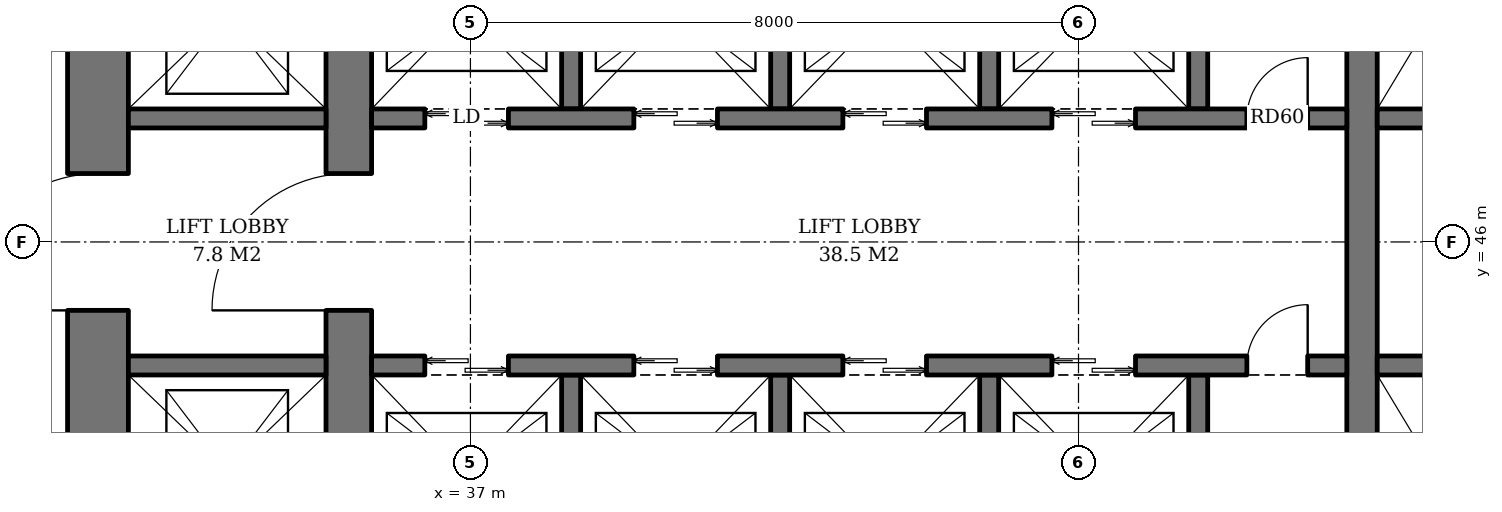
"""IFC4 building model, lengths in metres.
Left out: names, types, materials, properties, quantities, classifications, styles, units other than length and angle.
Written with IfcOpenShell. Run it as: python <this file> out.ifc"""

import sys

from ifc_helpers import new_model, si_unit, direction, frame, frame_2d, origin, place, context, subcontext, project, spatial, rectangle, extrude, element, fill, save


model = new_model("IFC4")
c1 = context("Model", 3, precision=1e-05, world=origin(), true_north=direction((0.0, 1.0)))
c2 = subcontext(c1, "Body", "Model", "MODEL_VIEW")
j1 = project(units=[si_unit("LENGTHUNIT", "METRE"), si_unit("PLANEANGLEUNIT", "RADIAN")], contexts=[c1])
p1 = place(None, origin())
s1 = spatial("IfcSite", under=j1, at=p1, CompositionType="ELEMENT")
p2 = place(p1, origin())
s2 = spatial("IfcBuilding", under=s1, at=p2, CompositionType="ELEMENT")
p3 = place(p2, frame((0.0, 0.0, 36.2)))
s3 = spatial("IfcBuildingStorey", under=s2, at=p3, CompositionType="ELEMENT", Elevation=36.2)
p4 = place(p3, frame((35.4, 36.7, 0.0), z_axis=(0.0, 0.0, 1.0), x_axis=(0.0, 1.0, 0.0)))
e1 = element("IfcWall", 1, at=p4, inside=s3, PredefinedType="SHEAR", context=c2, shape_type="SweptSolid", body=[
    extrude(rectangle(XDim=18.6, YDim=0.6, at=frame_2d((9.3, 0.0))), origin(), (0.0, 0.0, 1.0), 3.8),
])
p5 = place(p4, frame((8.4, 0.0, 0.0)))
e2 = element("IfcOpeningElement", 2, at=p5, cuts=e1, PredefinedType="OPENING", context=c2, shape_type="SweptSolid", body=[
    extrude(rectangle(XDim=1.8, YDim=2.4, at=frame_2d((0.9, 1.2))), frame((0.0, 0.31, 0.0), z_axis=(0.0, -1.0, 0.0), x_axis=(1.0, 0.0, 0.0)), (0.0, 0.0, 1.0), 0.62),
])
p6 = place(p3, frame((32.1, 33.5, 0.0), z_axis=(0.0, 0.0, 1.0), x_axis=(0.0, 1.0, 0.0)))
e3 = element("IfcWall", 3, at=p6, inside=s3, PredefinedType="SHEAR", context=c2, shape_type="SweptSolid", body=[
    extrude(rectangle(XDim=25.0, YDim=0.8, at=frame_2d((12.5, 0.0))), origin(), (0.0, 0.0, 1.0), 3.8),
])
p7 = place(p6, frame((11.6, 0.0, 0.0)))
e4 = element("IfcOpeningElement", 4, at=p7, cuts=e3, PredefinedType="OPENING", context=c2, shape_type="SweptSolid", body=[
    extrude(rectangle(XDim=1.8, YDim=2.4, at=frame_2d((0.9, 1.2))), frame((0.0, 0.41, 0.0), z_axis=(0.0, -1.0, 0.0), x_axis=(1.0, 0.0, 0.0)), (0.0, 0.0, 1.0), 0.82),
])
p8 = place(p3, frame((48.73, 40.0, 0.0), z_axis=(0.0, 0.0, 1.0), x_axis=(0.0, 1.0, 0.0)))
e5 = element("IfcWall", 5, at=p8, inside=s3, PredefinedType="SHEAR", context=c2, shape_type="SweptSolid", body=[
    extrude(rectangle(XDim=12.0, YDim=0.4, at=frame_2d((6.0, 0.0))), origin(), (0.0, 0.0, 1.0), 3.8),
])
for number, where, z_axis, x_axis in (
    (6, (38.325, 47.75, 0.0), (0.0, 0.0, 1.0), (0.0, 1.0, 0.0)),
    (7, (41.075, 47.75, 0.0), (0.0, 0.0, 1.0), (0.0, 1.0, 0.0)),
    (8, (43.825, 47.75, 0.0), (0.0, 0.0, 1.0), (0.0, 1.0, 0.0)),
    (9, (46.575, 47.75, 0.0), (0.0, 0.0, 1.0), (0.0, 1.0, 0.0)),
):
    element("IfcWall", number, at=place(p3, frame(where, z_axis=z_axis, x_axis=x_axis)), inside=s3, PredefinedType="SHEAR", context=c2, shape_type="SweptSolid", body=[
        extrude(rectangle(XDim=2.6, YDim=0.25, at=frame_2d((1.3, 0.0))), origin(), (0.0, 0.0, 1.0), 3.8),
    ])
p9 = place(p3, frame((35.7, 47.625, 0.0), z_axis=(0.0, 0.0, 1.0), x_axis=(1.0, 0.0, 0.0)))
e10 = element("IfcWall", 10, at=p9, inside=s3, PredefinedType="SHEAR", context=c2, shape_type="SweptSolid", body=[
    extrude(rectangle(XDim=12.83, YDim=0.25, at=frame_2d((6.415, 0.0))), origin(), (0.0, 0.0, 1.0), 3.8),
])
p10 = place(p9, frame((0.7, 0.0, 0.0)))
e11 = element("IfcOpeningElement", 11, at=p10, cuts=e10, PredefinedType="OPENING", context=c2, shape_type="SweptSolid", body=[
    extrude(rectangle(XDim=1.1, YDim=2.2, at=frame_2d((0.55, 1.1))), frame((0.0, 0.135, 0.0), z_axis=(0.0, -1.0, 0.0), x_axis=(1.0, 0.0, 0.0)), (0.0, 0.0, 1.0), 0.27),
])
p11 = place(p9, frame((3.45, 0.0, 0.0)))
e12 = element("IfcOpeningElement", 12, at=p11, cuts=e10, PredefinedType="OPENING", context=c2, shape_type="SweptSolid", body=[
    extrude(rectangle(XDim=1.1, YDim=2.2, at=frame_2d((0.55, 1.1))), frame((0.0, 0.135, 0.0), z_axis=(0.0, -1.0, 0.0), x_axis=(1.0, 0.0, 0.0)), (0.0, 0.0, 1.0), 0.27),
])
p12 = place(p9, frame((6.2, 0.0, 0.0)))
e13 = element("IfcOpeningElement", 13, at=p12, cuts=e10, PredefinedType="OPENING", context=c2, shape_type="SweptSolid", body=[
    extrude(rectangle(XDim=1.1, YDim=2.2, at=frame_2d((0.55, 1.1))), frame((0.0, 0.135, 0.0), z_axis=(0.0, -1.0, 0.0), x_axis=(1.0, 0.0, 0.0)), (0.0, 0.0, 1.0), 0.27),
])
p13 = place(p9, frame((8.95, 0.0, 0.0)))
e14 = element("IfcOpeningElement", 14, at=p13, cuts=e10, PredefinedType="OPENING", context=c2, shape_type="SweptSolid", body=[
    extrude(rectangle(XDim=1.1, YDim=2.2, at=frame_2d((0.55, 1.1))), frame((0.0, 0.135, 0.0), z_axis=(0.0, -1.0, 0.0), x_axis=(1.0, 0.0, 0.0)), (0.0, 0.0, 1.0), 0.27),
])
p14 = place(p9, frame((11.515, 0.0, 0.0)))
e15 = element("IfcOpeningElement", 15, at=p14, cuts=e10, PredefinedType="OPENING", context=c2, shape_type="SweptSolid", body=[
    extrude(rectangle(XDim=0.8, YDim=2.0, at=frame_2d((0.4, 1.0))), frame((0.0, 0.135, 0.0), z_axis=(0.0, -1.0, 0.0), x_axis=(1.0, 0.0, 0.0)), (0.0, 0.0, 1.0), 0.27),
])
for number, where, z_axis, x_axis in (
    (16, (38.325, 44.25, 0.0), (0.0, 0.0, 1.0), (0.0, -1.0, 0.0)),
    (17, (41.075, 44.25, 0.0), (0.0, 0.0, 1.0), (0.0, -1.0, 0.0)),
    (18, (43.825, 44.25, 0.0), (0.0, 0.0, 1.0), (0.0, -1.0, 0.0)),
    (19, (46.575, 44.25, 0.0), (0.0, 0.0, 1.0), (0.0, -1.0, 0.0)),
):
    element("IfcWall", number, at=place(p3, frame(where, z_axis=z_axis, x_axis=x_axis)), inside=s3, PredefinedType="SHEAR", context=c2, shape_type="SweptSolid", body=[
        extrude(rectangle(XDim=2.6, YDim=0.25, at=frame_2d((1.3, 0.0))), origin(), (0.0, 0.0, 1.0), 3.8),
    ])
p15 = place(p3, frame((35.7, 44.375, 0.0), z_axis=(0.0, 0.0, 1.0), x_axis=(1.0, 0.0, 0.0)))
e20 = element("IfcWall", 20, at=p15, inside=s3, PredefinedType="SHEAR", context=c2, shape_type="SweptSolid", body=[
    extrude(rectangle(XDim=12.83, YDim=0.25, at=frame_2d((6.415, 0.0))), origin(), (0.0, 0.0, 1.0), 3.8),
])
p16 = place(p15, frame((0.7, 0.0, 0.0)))
e21 = element("IfcOpeningElement", 21, at=p16, cuts=e20, PredefinedType="OPENING", context=c2, shape_type="SweptSolid", body=[
    extrude(rectangle(XDim=1.1, YDim=2.2, at=frame_2d((0.55, 1.1))), frame((0.0, 0.135, 0.0), z_axis=(0.0, -1.0, 0.0), x_axis=(1.0, 0.0, 0.0)), (0.0, 0.0, 1.0), 0.27),
])
p17 = place(p15, frame((3.45, 0.0, 0.0)))
e22 = element("IfcOpeningElement", 22, at=p17, cuts=e20, PredefinedType="OPENING", context=c2, shape_type="SweptSolid", body=[
    extrude(rectangle(XDim=1.1, YDim=2.2, at=frame_2d((0.55, 1.1))), frame((0.0, 0.135, 0.0), z_axis=(0.0, -1.0, 0.0), x_axis=(1.0, 0.0, 0.0)), (0.0, 0.0, 1.0), 0.27),
])
p18 = place(p15, frame((6.2, 0.0, 0.0)))
e23 = element("IfcOpeningElement", 23, at=p18, cuts=e20, PredefinedType="OPENING", context=c2, shape_type="SweptSolid", body=[
    extrude(rectangle(XDim=1.1, YDim=2.2, at=frame_2d((0.55, 1.1))), frame((0.0, 0.135, 0.0), z_axis=(0.0, -1.0, 0.0), x_axis=(1.0, 0.0, 0.0)), (0.0, 0.0, 1.0), 0.27),
])
p19 = place(p15, frame((8.95, 0.0, 0.0)))
e24 = element("IfcOpeningElement", 24, at=p19, cuts=e20, PredefinedType="OPENING", context=c2, shape_type="SweptSolid", body=[
    extrude(rectangle(XDim=1.1, YDim=2.2, at=frame_2d((0.55, 1.1))), frame((0.0, 0.135, 0.0), z_axis=(0.0, -1.0, 0.0), x_axis=(1.0, 0.0, 0.0)), (0.0, 0.0, 1.0), 0.27),
])
p20 = place(p15, frame((11.515, 0.0, 0.0)))
e25 = element("IfcOpeningElement", 25, at=p20, cuts=e20, PredefinedType="OPENING", context=c2, shape_type="SweptSolid", body=[
    extrude(rectangle(XDim=0.8, YDim=2.0, at=frame_2d((0.4, 1.0))), frame((0.0, 0.135, 0.0), z_axis=(0.0, -1.0, 0.0), x_axis=(1.0, 0.0, 0.0)), (0.0, 0.0, 1.0), 0.27),
])
for number, where, z_axis, x_axis in (
    (26, (48.93, 47.625, 0.0), (0.0, 0.0, 1.0), (1.0, 0.0, 0.0)),
    (27, (48.93, 44.375, 0.0), (0.0, 0.0, 1.0), (1.0, 0.0, 0.0)),
):
    element("IfcWall", number, at=place(p3, frame(where, z_axis=z_axis, x_axis=x_axis)), inside=s3, PredefinedType="SHEAR", context=c2, shape_type="SweptSolid", body=[
        extrude(rectangle(XDim=5.37, YDim=0.25, at=frame_2d((2.685, 0.0))), origin(), (0.0, 0.0, 1.0), 3.8),
    ])
for number, where, z_axis, x_axis in (
    (28, (32.5, 44.375, 0.0), (0.0, 0.0, 1.0), (1.0, 0.0, 0.0)),
    (29, (32.5, 47.625, 0.0), (0.0, 0.0, 1.0), (1.0, 0.0, 0.0)),
):
    element("IfcWall", number, at=place(p3, frame(where, z_axis=z_axis, x_axis=x_axis)), inside=s3, PredefinedType="SHEAR", context=c2, shape_type="SweptSolid", body=[
        extrude(rectangle(XDim=2.6, YDim=0.25, at=frame_2d((1.3, 0.0))), origin(), (0.0, 0.0, 1.0), 3.8),
    ])
p21 = place(p10, origin())
e30 = element("IfcDoor", 30, at=p21, inside=s3, OperationType="DOUBLE_DOOR_SLIDING", PredefinedType="DOOR", context=c2, shape_type="SweptSolid", body=[
    extrude(rectangle(XDim=1.1, YDim=2.2, at=frame_2d((0.55, 1.1))), frame((0.0, 0.025, 0.0), z_axis=(0.0, -1.0, 0.0), x_axis=(1.0, 0.0, 0.0)), (0.0, 0.0, 1.0), 0.05),
])
fill(e11, e30)
p22 = place(p11, origin())
e31 = element("IfcDoor", 31, at=p22, inside=s3, OperationType="DOUBLE_DOOR_SLIDING", PredefinedType="DOOR", context=c2, shape_type="SweptSolid", body=[
    extrude(rectangle(XDim=1.1, YDim=2.2, at=frame_2d((0.55, 1.1))), frame((0.0, 0.025, 0.0), z_axis=(0.0, -1.0, 0.0), x_axis=(1.0, 0.0, 0.0)), (0.0, 0.0, 1.0), 0.05),
])
fill(e12, e31)
p23 = place(p12, origin())
e32 = element("IfcDoor", 32, at=p23, inside=s3, OperationType="DOUBLE_DOOR_SLIDING", PredefinedType="DOOR", context=c2, shape_type="SweptSolid", body=[
    extrude(rectangle(XDim=1.1, YDim=2.2, at=frame_2d((0.55, 1.1))), frame((0.0, 0.025, 0.0), z_axis=(0.0, -1.0, 0.0), x_axis=(1.0, 0.0, 0.0)), (0.0, 0.0, 1.0), 0.05),
])
fill(e13, e32)
p24 = place(p13, origin())
e33 = element("IfcDoor", 33, at=p24, inside=s3, OperationType="DOUBLE_DOOR_SLIDING", PredefinedType="DOOR", context=c2, shape_type="SweptSolid", body=[
    extrude(rectangle(XDim=1.1, YDim=2.2, at=frame_2d((0.55, 1.1))), frame((0.0, 0.025, 0.0), z_axis=(0.0, -1.0, 0.0), x_axis=(1.0, 0.0, 0.0)), (0.0, 0.0, 1.0), 0.05),
])
fill(e14, e33)
p25 = place(p14, origin())
e34 = element("IfcDoor", 34, at=p25, inside=s3, OperationType="SINGLE_SWING_RIGHT", PredefinedType="DOOR", context=c2, shape_type="SweptSolid", body=[
    extrude(rectangle(XDim=0.8, YDim=2.0, at=frame_2d((0.4, 1.0))), frame((0.0, 0.025, 0.0), z_axis=(0.0, -1.0, 0.0), x_axis=(1.0, 0.0, 0.0)), (0.0, 0.0, 1.0), 0.05),
])
fill(e15, e34)
p26 = place(p16, origin())
e35 = element("IfcDoor", 35, at=p26, inside=s3, OperationType="DOUBLE_DOOR_SLIDING", PredefinedType="DOOR", context=c2, shape_type="SweptSolid", body=[
    extrude(rectangle(XDim=1.1, YDim=2.2, at=frame_2d((0.55, 1.1))), frame((0.0, 0.025, 0.0), z_axis=(0.0, -1.0, 0.0), x_axis=(1.0, 0.0, 0.0)), (0.0, 0.0, 1.0), 0.05),
])
fill(e21, e35)
p27 = place(p17, origin())
e36 = element("IfcDoor", 36, at=p27, inside=s3, OperationType="DOUBLE_DOOR_SLIDING", PredefinedType="DOOR", context=c2, shape_type="SweptSolid", body=[
    extrude(rectangle(XDim=1.1, YDim=2.2, at=frame_2d((0.55, 1.1))), frame((0.0, 0.025, 0.0), z_axis=(0.0, -1.0, 0.0), x_axis=(1.0, 0.0, 0.0)), (0.0, 0.0, 1.0), 0.05),
])
fill(e22, e36)
p28 = place(p18, origin())
e37 = element("IfcDoor", 37, at=p28, inside=s3, OperationType="DOUBLE_DOOR_SLIDING", PredefinedType="DOOR", context=c2, shape_type="SweptSolid", body=[
    extrude(rectangle(XDim=1.1, YDim=2.2, at=frame_2d((0.55, 1.1))), frame((0.0, 0.025, 0.0), z_axis=(0.0, -1.0, 0.0), x_axis=(1.0, 0.0, 0.0)), (0.0, 0.0, 1.0), 0.05),
])
fill(e23, e37)
p29 = place(p19, origin())
e38 = element("IfcDoor", 38, at=p29, inside=s3, OperationType="DOUBLE_DOOR_SLIDING", PredefinedType="DOOR", context=c2, shape_type="SweptSolid", body=[
    extrude(rectangle(XDim=1.1, YDim=2.2, at=frame_2d((0.55, 1.1))), frame((0.0, 0.025, 0.0), z_axis=(0.0, -1.0, 0.0), x_axis=(1.0, 0.0, 0.0)), (0.0, 0.0, 1.0), 0.05),
])
fill(e24, e38)
p30 = place(p20, origin())
e39 = element("IfcDoor", 39, at=p30, inside=s3, OperationType="SINGLE_SWING_RIGHT", PredefinedType="DOOR", context=c2, shape_type="SweptSolid", body=[
    extrude(rectangle(XDim=0.8, YDim=2.0, at=frame_2d((0.4, 1.0))), frame((0.0, 0.025, 0.0), z_axis=(0.0, -1.0, 0.0), x_axis=(1.0, 0.0, 0.0)), (0.0, 0.0, 1.0), 0.05),
])
fill(e25, e39)
p31 = place(p5, origin())
e40 = element("IfcDoor", 40, at=p31, inside=s3, OperationType="DOUBLE_DOOR_SINGLE_SWING", PredefinedType="DOOR", context=c2, shape_type="SweptSolid", body=[
    extrude(rectangle(XDim=1.8, YDim=2.4, at=frame_2d((0.9, 1.2))), frame((0.0, 0.025, 0.0), z_axis=(0.0, -1.0, 0.0), x_axis=(1.0, 0.0, 0.0)), (0.0, 0.0, 1.0), 0.05),
])
fill(e2, e40)
p32 = place(p7, origin())
e41 = element("IfcDoor", 41, at=p32, inside=s3, OperationType="DOUBLE_DOOR_SINGLE_SWING", PredefinedType="DOOR", context=c2, shape_type="SweptSolid", body=[
    extrude(rectangle(XDim=1.8, YDim=2.4, at=frame_2d((0.9, 1.2))), frame((0.0, 0.025, 0.0), z_axis=(0.0, -1.0, 0.0), x_axis=(1.0, 0.0, 0.0)), (0.0, 0.0, 1.0), 0.05),
])
fill(e4, e41)
save(model, sys.argv[1])
